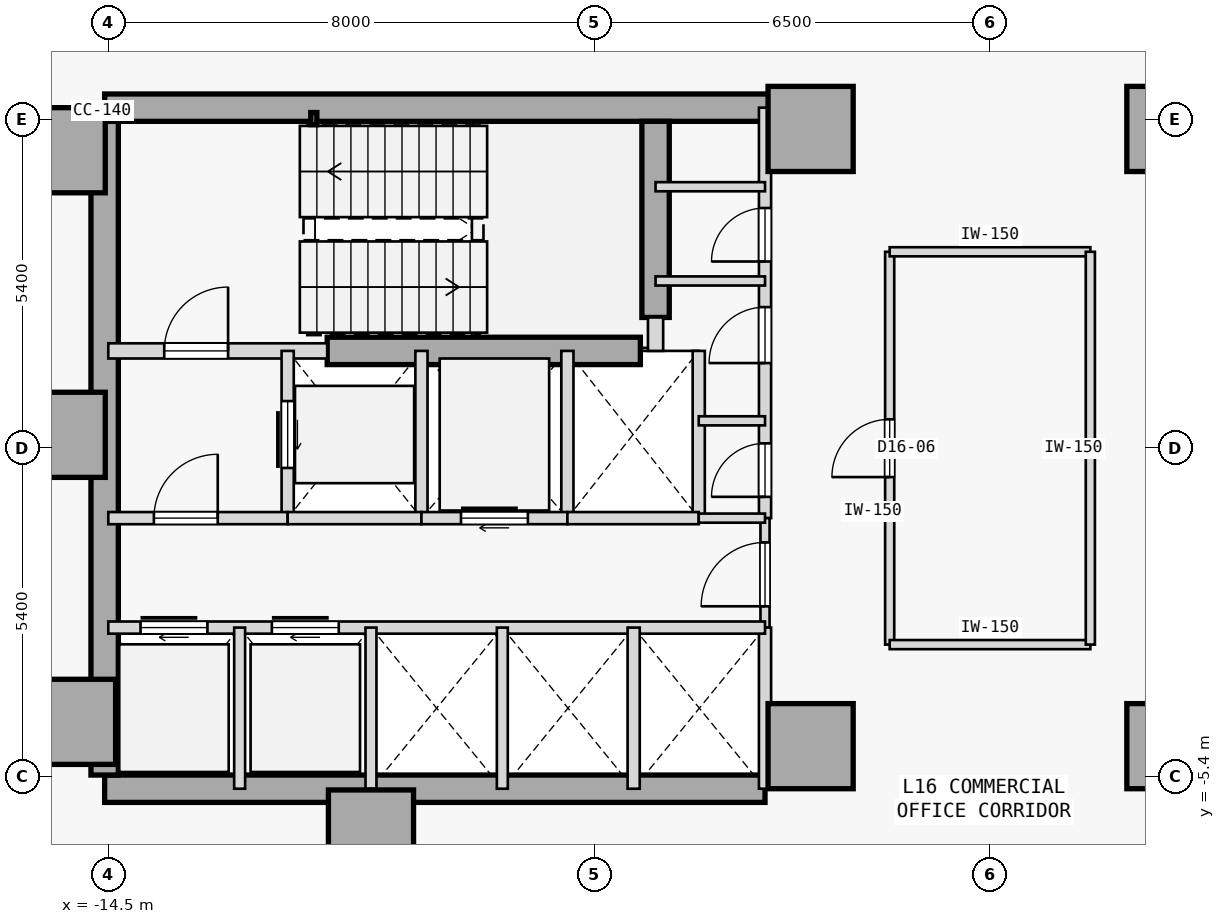
"""IFC4 building model, lengths in metres.
Left out: names, types, materials, properties, quantities, classifications, styles, units other than length and angle.
Written with IfcOpenShell. Run it as: python <this file> out.ifc"""

import sys

from ifc_helpers import new_model, si_unit, direction, frame, frame_2d, origin, origin_2d, place, context, subcontext, project, spatial, rectangle, hollow_rectangle, extrude, element, fill, save


model = new_model("IFC4")
c1 = context("Model", 3, precision=1e-05, world=origin(), true_north=direction((0.0, 1.0)))
c2 = subcontext(c1, "Body", "Model", "MODEL_VIEW")
j1 = project(units=[si_unit("LENGTHUNIT", "METRE"), si_unit("PLANEANGLEUNIT", "RADIAN")], contexts=[c1])
p1 = place(None, origin())
s1 = spatial("IfcSite", under=j1, at=p1, CompositionType="ELEMENT")
p2 = place(p1, origin())
s2 = spatial("IfcBuilding", under=s1, at=p2, CompositionType="ELEMENT")
p3 = place(p2, frame((0.0, 0.0, 67.4)))
s3 = spatial("IfcBuildingStorey", under=s2, at=p3, CompositionType="ELEMENT", Elevation=67.4)
for number, where, z_axis, x_axis in (
    (1, (-15.25, 4.9, 0.0), (0.0, 0.0, 1.0), (1.0, 0.0, 0.0)),
    (2, (-15.25, 0.22, 0.0), (0.0, 0.0, 1.0), (1.0, 0.0, 0.0)),
    (3, (-15.08, -4.5, 0.0), (0.0, 0.0, 1.0), (1.0, 0.0, 0.0)),
    (4, (-10.18, -6.32, 0.0), (0.0, 0.0, 1.0), (1.0, 0.0, 0.0)),
    (5, (-2.95, -4.9, 0.0), (0.0, 0.0, 1.0), (1.0, 0.0, 0.0)),
    (6, (-2.95, 5.25, 0.0), (0.0, 0.0, 1.0), (1.0, 0.0, 0.0)),
    (7, (2.95, -4.9, 0.0), (0.0, 0.0, 1.0), (1.0, 0.0, 0.0)),
    (8, (2.95, 5.25, 0.0), (0.0, 0.0, 1.0), (1.0, 0.0, 0.0)),
):
    element("IfcColumn", number, at=place(p3, frame(where, z_axis=z_axis, x_axis=x_axis)), inside=s3, PredefinedType="COLUMN", context=c2, shape_type="SweptSolid", body=[
        extrude(rectangle(XDim=1.4, YDim=1.4, at=origin_2d()), origin(), (0.0, 0.0, 1.0), 3.8),
    ])
p4 = place(p3, frame((-14.56, 5.6, 0.0), z_axis=(0.0, 0.0, 1.0), x_axis=(1.0, 0.0, 0.0)))
e9 = element("IfcWall", 9, at=p4, inside=s3, PredefinedType="SHEAR", context=c2, shape_type="SweptSolid", body=[
    extrude(rectangle(XDim=11.41, YDim=0.45, at=frame_2d((5.705, 0.0))), origin(), (0.0, 0.0, 1.0), 3.575),
])
p5 = place(p3, frame((-14.56, -5.6, 0.0), z_axis=(0.0, 0.0, 1.0), x_axis=(1.0, 0.0, 0.0)))
e10 = element("IfcWall", 10, at=p5, inside=s3, PredefinedType="SHEAR", context=c2, shape_type="SweptSolid", body=[
    extrude(rectangle(XDim=10.86, YDim=0.45, at=frame_2d((5.43, 0.0))), origin(), (0.0, 0.0, 1.0), 3.575),
])
p6 = place(p3, frame((-14.56, -5.375, 0.0), z_axis=(0.0, 0.0, 1.0), x_axis=(0.0, 1.0, 0.0)))
e11 = element("IfcWall", 11, at=p6, inside=s3, PredefinedType="SHEAR", context=c2, shape_type="SweptSolid", body=[
    extrude(rectangle(XDim=10.75, YDim=0.45, at=frame_2d((5.375, 0.0))), origin(), (0.0, 0.0, 1.0), 3.575),
])
p7 = place(p3, frame((-5.5, 2.15, 0.0), z_axis=(0.0, 0.0, 1.0), x_axis=(0.0, 1.0, 0.0)))
e12 = element("IfcWall", 12, at=p7, inside=s3, PredefinedType="SHEAR", context=c2, shape_type="SweptSolid", body=[
    extrude(rectangle(XDim=3.225, YDim=0.45, at=frame_2d((1.613, 0.0))), origin(), (0.0, 0.0, 1.0), 3.575),
])
p8 = place(p3, frame((-10.9, 1.6, 0.0), z_axis=(0.0, 0.0, 1.0), x_axis=(1.0, 0.0, 0.0)))
e13 = element("IfcWall", 13, at=p8, inside=s3, PredefinedType="SHEAR", context=c2, shape_type="SweptSolid", body=[
    extrude(rectangle(XDim=5.15, YDim=0.45, at=frame_2d((2.575, 0.0))), origin(), (0.0, 0.0, 1.0), 3.575),
])
p9 = place(p3, frame((-11.12, 5.42, 0.0), z_axis=(0.0, 0.0, 1.0), x_axis=(1.0, 0.0, 0.0)))
e14 = element("IfcColumn", 14, at=p9, inside=s3, PredefinedType="COLUMN", context=c2, shape_type="SweptSolid", body=[
    extrude(hollow_rectangle(XDim=0.1, YDim=0.2, WallThickness=0.008, at=origin_2d()), origin(), (0.0, 0.0, 1.0), 3.8),
])
p10 = place(p3, frame((-14.5, 1.6, 0.0), z_axis=(0.0, 0.0, 1.0), x_axis=(1.0, 0.0, 0.0)))
e15 = element("IfcWall", 15, at=p10, inside=s3, PredefinedType="STANDARD", context=c2, shape_type="SweptSolid", body=[
    extrude(rectangle(XDim=3.6, YDim=0.25, at=frame_2d((1.8, 0.0))), origin(), (0.0, 0.0, 1.0), 3.575),
])
p11 = place(p10, frame((0.92, 0.0, 0.0)))
e16 = element("IfcOpeningElement", 16, at=p11, cuts=e15, PredefinedType="OPENING", context=c2, shape_type="SweptSolid", body=[
    extrude(rectangle(XDim=1.05, YDim=2.15, at=frame_2d((0.525, 1.075))), frame((0.0, 0.135, 0.0), z_axis=(0.0, -1.0, 0.0), x_axis=(1.0, 0.0, 0.0)), (0.0, 0.0, 1.0), 0.27),
])
p12 = place(p3, frame((-5.5, 1.6, 0.0), z_axis=(0.0, 0.0, 1.0), x_axis=(0.0, 1.0, 0.0)))
e17 = element("IfcWall", 17, at=p12, inside=s3, PredefinedType="STANDARD", context=c2, shape_type="SweptSolid", body=[
    extrude(rectangle(XDim=0.55, YDim=0.25, at=frame_2d((0.275, 0.0))), origin(), (0.0, 0.0, 1.0), 3.575),
])
p13 = place(p3, frame((-3.7, -1.15, 0.0), z_axis=(0.0, 0.0, 1.0), x_axis=(0.0, 1.0, 0.0)))
e18 = element("IfcWall", 18, at=p13, inside=s3, PredefinedType="STANDARD", context=c2, shape_type="SweptSolid", body=[
    extrude(rectangle(XDim=6.75, YDim=0.2, at=frame_2d((3.375, 0.0))), origin(), (0.0, 0.0, 1.0), 3.575),
])
p14 = place(p13, frame((0.35, 0.0, 0.0)))
e19 = element("IfcOpeningElement", 19, at=p14, cuts=e18, PredefinedType="OPENING", context=c2, shape_type="SweptSolid", body=[
    extrude(rectangle(XDim=0.88, YDim=2.15, at=frame_2d((0.44, 1.075))), frame((0.0, 0.11, 0.0), z_axis=(0.0, -1.0, 0.0), x_axis=(1.0, 0.0, 0.0)), (0.0, 0.0, 1.0), 0.22),
])
p15 = place(p13, frame((2.55, 0.0, 0.0)))
e20 = element("IfcOpeningElement", 20, at=p15, cuts=e18, PredefinedType="OPENING", context=c2, shape_type="SweptSolid", body=[
    extrude(rectangle(XDim=0.92, YDim=2.15, at=frame_2d((0.46, 1.075))), frame((0.0, 0.11, 0.0), z_axis=(0.0, -1.0, 0.0), x_axis=(1.0, 0.0, 0.0)), (0.0, 0.0, 1.0), 0.22),
])
p16 = place(p13, frame((4.22, 0.0, 0.0)))
e21 = element("IfcOpeningElement", 21, at=p16, cuts=e18, PredefinedType="OPENING", context=c2, shape_type="SweptSolid", body=[
    extrude(rectangle(XDim=0.88, YDim=2.15, at=frame_2d((0.44, 1.075))), frame((0.0, 0.11, 0.0), z_axis=(0.0, -1.0, 0.0), x_axis=(1.0, 0.0, 0.0)), (0.0, 0.0, 1.0), 0.22),
])
p17 = place(p3, frame((-3.7, -2.95, 0.0), z_axis=(0.0, 0.0, 1.0), x_axis=(0.0, 1.0, 0.0)))
e22 = element("IfcWall", 22, at=p17, inside=s3, PredefinedType="PARTITIONING", context=c2, shape_type="SweptSolid", body=[
    extrude(rectangle(XDim=1.8, YDim=0.15, at=frame_2d((0.9, 0.0))), origin(), (0.0, 0.0, 1.0), 3.575),
])
p18 = place(p17, frame((0.35, 0.0, 0.0)))
e23 = element("IfcOpeningElement", 23, at=p18, cuts=e22, PredefinedType="OPENING", context=c2, shape_type="SweptSolid", body=[
    extrude(rectangle(XDim=1.05, YDim=2.18, at=frame_2d((0.525, 1.09))), frame((0.0, 0.085, 0.0), z_axis=(0.0, -1.0, 0.0), x_axis=(1.0, 0.0, 0.0)), (0.0, 0.0, 1.0), 0.17),
])
p19 = place(p3, frame((-3.7, -5.6, 0.0), z_axis=(0.0, 0.0, 1.0), x_axis=(0.0, 1.0, 0.0)))
e24 = element("IfcWall", 24, at=p19, inside=s3, PredefinedType="STANDARD", context=c2, shape_type="SweptSolid", body=[
    extrude(rectangle(XDim=2.65, YDim=0.2, at=frame_2d((1.325, 0.0))), origin(), (0.0, 0.0, 1.0), 3.575),
])
p20 = place(p3, frame((-11.55, -1.15, 0.0), z_axis=(0.0, 0.0, 1.0), x_axis=(0.0, 1.0, 0.0)))
e25 = element("IfcWall", 25, at=p20, inside=s3, PredefinedType="STANDARD", context=c2, shape_type="SweptSolid", body=[
    extrude(rectangle(XDim=2.75, YDim=0.2, at=frame_2d((1.375, 0.0))), origin(), (0.0, 0.0, 1.0), 3.575),
])
p21 = place(p20, frame((0.825, 0.0, 0.0)))
e26 = element("IfcOpeningElement", 26, at=p21, cuts=e25, PredefinedType="OPENING", context=c2, shape_type="SweptSolid", body=[
    extrude(rectangle(XDim=1.1, YDim=2.15, at=frame_2d((0.55, 1.075))), frame((0.0, 0.11, 0.0), z_axis=(0.0, -1.0, 0.0), x_axis=(1.0, 0.0, 0.0)), (0.0, 0.0, 1.0), 0.22),
])
p22 = place(p3, frame((-9.35, -1.15, 0.0), z_axis=(0.0, 0.0, 1.0), x_axis=(0.0, 1.0, 0.0)))
e27 = element("IfcWall", 27, at=p22, inside=s3, PredefinedType="STANDARD", context=c2, shape_type="SweptSolid", body=[
    extrude(rectangle(XDim=2.75, YDim=0.2, at=frame_2d((1.375, 0.0))), origin(), (0.0, 0.0, 1.0), 3.575),
])
p23 = place(p3, frame((-14.5, -1.15, 0.0), z_axis=(0.0, 0.0, 1.0), x_axis=(1.0, 0.0, 0.0)))
e28 = element("IfcWall", 28, at=p23, inside=s3, PredefinedType="STANDARD", context=c2, shape_type="SweptSolid", body=[
    extrude(rectangle(XDim=2.95, YDim=0.2, at=frame_2d((1.475, 0.0))), origin(), (0.0, 0.0, 1.0), 3.575),
])
p24 = place(p23, frame((0.75, 0.0, 0.0)))
e29 = element("IfcOpeningElement", 29, at=p24, cuts=e28, PredefinedType="OPENING", context=c2, shape_type="SweptSolid", body=[
    extrude(rectangle(XDim=1.05, YDim=2.18, at=frame_2d((0.525, 1.09))), frame((0.0, 0.11, 0.0), z_axis=(0.0, -1.0, 0.0), x_axis=(1.0, 0.0, 0.0)), (0.0, 0.0, 1.0), 0.22),
])
p25 = place(p3, frame((-11.55, -1.15, 0.0), z_axis=(0.0, 0.0, 1.0), x_axis=(1.0, 0.0, 0.0)))
e30 = element("IfcWall", 30, at=p25, inside=s3, PredefinedType="STANDARD", context=c2, shape_type="SweptSolid", body=[
    extrude(rectangle(XDim=2.2, YDim=0.2, at=frame_2d((1.1, 0.0))), origin(), (0.0, 0.0, 1.0), 3.575),
])
p26 = place(p3, frame((-6.95, -1.15, 0.0), z_axis=(0.0, 0.0, 1.0), x_axis=(0.0, 1.0, 0.0)))
e31 = element("IfcWall", 31, at=p26, inside=s3, PredefinedType="STANDARD", context=c2, shape_type="SweptSolid", body=[
    extrude(rectangle(XDim=2.75, YDim=0.2, at=frame_2d((1.375, 0.0))), origin(), (0.0, 0.0, 1.0), 3.575),
])
p27 = place(p3, frame((-9.35, -1.15, 0.0), z_axis=(0.0, 0.0, 1.0), x_axis=(1.0, 0.0, 0.0)))
e32 = element("IfcWall", 32, at=p27, inside=s3, PredefinedType="STANDARD", context=c2, shape_type="SweptSolid", body=[
    extrude(rectangle(XDim=2.4, YDim=0.2, at=frame_2d((1.2, 0.0))), origin(), (0.0, 0.0, 1.0), 3.575),
])
p28 = place(p27, frame((0.65, 0.0, 0.0)))
e33 = element("IfcOpeningElement", 33, at=p28, cuts=e32, PredefinedType="OPENING", context=c2, shape_type="SweptSolid", body=[
    extrude(rectangle(XDim=1.1, YDim=2.15, at=frame_2d((0.55, 1.075))), frame((0.0, 0.11, 0.0), z_axis=(0.0, -1.0, 0.0), x_axis=(1.0, 0.0, 0.0)), (0.0, 0.0, 1.0), 0.22),
])
p29 = place(p3, frame((-4.79, -1.15, 0.0), z_axis=(0.0, 0.0, 1.0), x_axis=(0.0, 1.0, 0.0)))
e34 = element("IfcWall", 34, at=p29, inside=s3, PredefinedType="STANDARD", context=c2, shape_type="SweptSolid", body=[
    extrude(rectangle(XDim=2.75, YDim=0.2, at=frame_2d((1.375, 0.0))), origin(), (0.0, 0.0, 1.0), 3.575),
])
p30 = place(p3, frame((-6.95, -1.15, 0.0), z_axis=(0.0, 0.0, 1.0), x_axis=(1.0, 0.0, 0.0)))
e35 = element("IfcWall", 35, at=p30, inside=s3, PredefinedType="STANDARD", context=c2, shape_type="SweptSolid", body=[
    extrude(rectangle(XDim=2.16, YDim=0.2, at=frame_2d((1.08, 0.0))), origin(), (0.0, 0.0, 1.0), 3.575),
])
p31 = place(p3, frame((-4.79, -1.15, 0.0), z_axis=(0.0, 0.0, 1.0), x_axis=(1.0, 0.0, 0.0)))
e36 = element("IfcWall", 36, at=p31, inside=s3, PredefinedType="PARTITIONING", context=c2, shape_type="SweptSolid", body=[
    extrude(rectangle(XDim=1.09, YDim=0.15, at=frame_2d((0.545, 0.0))), origin(), (0.0, 0.0, 1.0), 3.575),
])
p32 = place(p3, frame((-14.5, -2.95, 0.0), z_axis=(0.0, 0.0, 1.0), x_axis=(1.0, 0.0, 0.0)))
e37 = element("IfcWall", 37, at=p32, inside=s3, PredefinedType="STANDARD", context=c2, shape_type="SweptSolid", body=[
    extrude(rectangle(XDim=10.8, YDim=0.2, at=frame_2d((5.4, 0.0))), origin(), (0.0, 0.0, 1.0), 3.575),
])
p33 = place(p32, frame((0.53, 0.0, 0.0)))
e38 = element("IfcOpeningElement", 38, at=p33, cuts=e37, PredefinedType="OPENING", context=c2, shape_type="SweptSolid", body=[
    extrude(rectangle(XDim=1.1, YDim=2.15, at=frame_2d((0.55, 1.075))), frame((0.0, 0.11, 0.0), z_axis=(0.0, -1.0, 0.0), x_axis=(1.0, 0.0, 0.0)), (0.0, 0.0, 1.0), 0.22),
])
p34 = place(p32, frame((2.69, 0.0, 0.0)))
e39 = element("IfcOpeningElement", 39, at=p34, cuts=e37, PredefinedType="OPENING", context=c2, shape_type="SweptSolid", body=[
    extrude(rectangle(XDim=1.1, YDim=2.15, at=frame_2d((0.55, 1.075))), frame((0.0, 0.11, 0.0), z_axis=(0.0, -1.0, 0.0), x_axis=(1.0, 0.0, 0.0)), (0.0, 0.0, 1.0), 0.22),
])
p35 = place(p3, frame((-5.86, -5.6, 0.0), z_axis=(0.0, 0.0, 1.0), x_axis=(0.0, 1.0, 0.0)))
e40 = element("IfcWall", 40, at=p35, inside=s3, PredefinedType="STANDARD", context=c2, shape_type="SweptSolid", body=[
    extrude(rectangle(XDim=2.65, YDim=0.2, at=frame_2d((1.325, 0.0))), origin(), (0.0, 0.0, 1.0), 3.575),
])
for number, where, z_axis, x_axis in (
    (41, (-12.34, -5.6, 0.0), (0.0, 0.0, 1.0), (0.0, 1.0, 0.0)),
    (42, (-10.18, -5.6, 0.0), (0.0, 0.0, 1.0), (0.0, 1.0, 0.0)),
    (43, (-8.02, -5.6, 0.0), (0.0, 0.0, 1.0), (0.0, 1.0, 0.0)),
):
    element("IfcWall", number, at=place(p3, frame(where, z_axis=z_axis, x_axis=x_axis)), inside=s3, PredefinedType="STANDARD", context=c2, shape_type="SweptSolid", body=[
        extrude(rectangle(XDim=2.65, YDim=0.18, at=frame_2d((1.325, 0.0))), origin(), (0.0, 0.0, 1.0), 3.575),
    ])
p36 = place(p3, frame((-5.5, 4.3, 0.0), z_axis=(0.0, 0.0, 1.0), x_axis=(1.0, 0.0, 0.0)))
e44 = element("IfcWall", 44, at=p36, inside=s3, PredefinedType="PARTITIONING", context=c2, shape_type="SweptSolid", body=[
    extrude(rectangle(XDim=1.8, YDim=0.15, at=frame_2d((0.9, 0.0))), origin(), (0.0, 0.0, 1.0), 3.575),
])
p37 = place(p3, frame((-4.79, 0.45, 0.0), z_axis=(0.0, 0.0, 1.0), x_axis=(1.0, 0.0, 0.0)))
e45 = element("IfcWall", 45, at=p37, inside=s3, PredefinedType="PARTITIONING", context=c2, shape_type="SweptSolid", body=[
    extrude(rectangle(XDim=1.09, YDim=0.15, at=frame_2d((0.545, 0.0))), origin(), (0.0, 0.0, 1.0), 3.575),
])
p38 = place(p3, frame((-5.5, 2.75, 0.0), z_axis=(0.0, 0.0, 1.0), x_axis=(1.0, 0.0, 0.0)))
e46 = element("IfcWall", 46, at=p38, inside=s3, PredefinedType="PARTITIONING", context=c2, shape_type="SweptSolid", body=[
    extrude(rectangle(XDim=1.8, YDim=0.15, at=frame_2d((0.9, 0.0))), origin(), (0.0, 0.0, 1.0), 3.575),
])
p39 = place(p3, frame((-1.65, -3.23, 0.0), z_axis=(0.0, 0.0, 1.0), x_axis=(0.0, 1.0, 0.0)))
e47 = element("IfcWall", 47, at=p39, inside=s3, PredefinedType="PARTITIONING", context=c2, shape_type="SweptSolid", body=[
    extrude(rectangle(XDim=6.46, YDim=0.15, at=frame_2d((3.23, 0.0))), origin(), (0.0, 0.0, 1.0), 3.575),
])
p40 = place(p39, frame((2.755, 0.0, 0.0)))
e48 = element("IfcOpeningElement", 48, at=p40, cuts=e47, PredefinedType="OPENING", context=c2, shape_type="SweptSolid", body=[
    extrude(rectangle(XDim=0.95, YDim=2.15, at=frame_2d((0.475, 1.075))), frame((0.0, 0.085, 0.0), z_axis=(0.0, -1.0, 0.0), x_axis=(1.0, 0.0, 0.0)), (0.0, 0.0, 1.0), 0.17),
])
for number, where, z_axis, x_axis in (
    (49, (-1.65, -3.23, 0.0), (0.0, 0.0, 1.0), (1.0, 0.0, 0.0)),
    (50, (-1.65, 3.23, 0.0), (0.0, 0.0, 1.0), (1.0, 0.0, 0.0)),
):
    element("IfcWall", number, at=place(p3, frame(where, z_axis=z_axis, x_axis=x_axis)), inside=s3, PredefinedType="PARTITIONING", context=c2, shape_type="SweptSolid", body=[
        extrude(rectangle(XDim=3.3, YDim=0.15, at=frame_2d((1.65, 0.0))), origin(), (0.0, 0.0, 1.0), 3.575),
    ])
p41 = place(p3, frame((1.65, -3.23, 0.0), z_axis=(0.0, 0.0, 1.0), x_axis=(0.0, 1.0, 0.0)))
e51 = element("IfcWall", 51, at=p41, inside=s3, PredefinedType="PARTITIONING", context=c2, shape_type="SweptSolid", body=[
    extrude(rectangle(XDim=6.46, YDim=0.15, at=frame_2d((3.23, 0.0))), origin(), (0.0, 0.0, 1.0), 3.575),
])
p42 = place(p11, origin())
e52 = element("IfcDoor", 52, at=p42, inside=s3, OperationType="SINGLE_SWING_RIGHT", PredefinedType="DOOR", context=c2, shape_type="SweptSolid", body=[
    extrude(rectangle(XDim=1.05, YDim=2.15, at=frame_2d((0.525, 1.075))), frame((0.0, 0.025, 0.0), z_axis=(0.0, -1.0, 0.0), x_axis=(1.0, 0.0, 0.0)), (0.0, 0.0, 1.0), 0.05),
])
fill(e16, e52)
p43 = place(p24, origin())
e53 = element("IfcDoor", 53, at=p43, inside=s3, OperationType="SINGLE_SWING_RIGHT", PredefinedType="DOOR", context=c2, shape_type="SweptSolid", body=[
    extrude(rectangle(XDim=1.05, YDim=2.18, at=frame_2d((0.525, 1.09))), frame((0.0, 0.025, 0.0), z_axis=(0.0, -1.0, 0.0), x_axis=(1.0, 0.0, 0.0)), (0.0, 0.0, 1.0), 0.05),
])
fill(e29, e53)
p44 = place(p18, origin())
e54 = element("IfcDoor", 54, at=p44, inside=s3, OperationType="SINGLE_SWING_LEFT", PredefinedType="DOOR", context=c2, shape_type="SweptSolid", body=[
    extrude(rectangle(XDim=1.05, YDim=2.18, at=frame_2d((0.525, 1.09))), frame((0.0, 0.025, 0.0), z_axis=(0.0, -1.0, 0.0), x_axis=(1.0, 0.0, 0.0)), (0.0, 0.0, 1.0), 0.05),
])
fill(e23, e54)
p45 = place(p21, origin())
e55 = element("IfcDoor", 55, at=p45, inside=s3, OperationType="SLIDING_TO_RIGHT", PredefinedType="DOOR", context=c2, shape_type="SweptSolid", body=[
    extrude(rectangle(XDim=1.1, YDim=2.15, at=frame_2d((0.55, 1.075))), frame((0.0, 0.025, 0.0), z_axis=(0.0, -1.0, 0.0), x_axis=(1.0, 0.0, 0.0)), (0.0, 0.0, 1.0), 0.05),
])
fill(e26, e55)
p46 = place(p28, origin())
e56 = element("IfcDoor", 56, at=p46, inside=s3, OperationType="SLIDING_TO_RIGHT", PredefinedType="DOOR", context=c2, shape_type="SweptSolid", body=[
    extrude(rectangle(XDim=1.1, YDim=2.15, at=frame_2d((0.55, 1.075))), frame((0.0, 0.025, 0.0), z_axis=(0.0, -1.0, 0.0), x_axis=(1.0, 0.0, 0.0)), (0.0, 0.0, 1.0), 0.05),
])
fill(e33, e56)
p47 = place(p33, origin())
e57 = element("IfcDoor", 57, at=p47, inside=s3, OperationType="SLIDING_TO_RIGHT", PredefinedType="DOOR", context=c2, shape_type="SweptSolid", body=[
    extrude(rectangle(XDim=1.1, YDim=2.15, at=frame_2d((0.55, 1.075))), frame((0.0, 0.025, 0.0), z_axis=(0.0, -1.0, 0.0), x_axis=(1.0, 0.0, 0.0)), (0.0, 0.0, 1.0), 0.05),
])
fill(e38, e57)
p48 = place(p34, origin())
e58 = element("IfcDoor", 58, at=p48, inside=s3, OperationType="SLIDING_TO_RIGHT", PredefinedType="DOOR", context=c2, shape_type="SweptSolid", body=[
    extrude(rectangle(XDim=1.1, YDim=2.15, at=frame_2d((0.55, 1.075))), frame((0.0, 0.025, 0.0), z_axis=(0.0, -1.0, 0.0), x_axis=(1.0, 0.0, 0.0)), (0.0, 0.0, 1.0), 0.05),
])
fill(e39, e58)
p49 = place(p14, origin())
e59 = element("IfcDoor", 59, at=p49, inside=s3, OperationType="SINGLE_SWING_LEFT", PredefinedType="DOOR", context=c2, shape_type="SweptSolid", body=[
    extrude(rectangle(XDim=0.88, YDim=2.15, at=frame_2d((0.44, 1.075))), frame((0.0, 0.025, 0.0), z_axis=(0.0, -1.0, 0.0), x_axis=(1.0, 0.0, 0.0)), (0.0, 0.0, 1.0), 0.05),
])
fill(e19, e59)
p50 = place(p15, origin())
e60 = element("IfcDoor", 60, at=p50, inside=s3, OperationType="SINGLE_SWING_LEFT", PredefinedType="DOOR", context=c2, shape_type="SweptSolid", body=[
    extrude(rectangle(XDim=0.92, YDim=2.15, at=frame_2d((0.46, 1.075))), frame((0.0, 0.025, 0.0), z_axis=(0.0, -1.0, 0.0), x_axis=(1.0, 0.0, 0.0)), (0.0, 0.0, 1.0), 0.05),
])
fill(e20, e60)
p51 = place(p16, origin())
e61 = element("IfcDoor", 61, at=p51, inside=s3, OperationType="SINGLE_SWING_LEFT", PredefinedType="DOOR", context=c2, shape_type="SweptSolid", body=[
    extrude(rectangle(XDim=0.88, YDim=2.15, at=frame_2d((0.44, 1.075))), frame((0.0, 0.025, 0.0), z_axis=(0.0, -1.0, 0.0), x_axis=(1.0, 0.0, 0.0)), (0.0, 0.0, 1.0), 0.05),
])
fill(e21, e61)
p52 = place(p40, origin())
e62 = element("IfcDoor", 62, at=p52, inside=s3, OperationType="SINGLE_SWING_LEFT", PredefinedType="DOOR", context=c2, shape_type="SweptSolid", body=[
    extrude(rectangle(XDim=0.95, YDim=2.15, at=frame_2d((0.475, 1.075))), frame((0.0, 0.025, 0.0), z_axis=(0.0, -1.0, 0.0), x_axis=(1.0, 0.0, 0.0)), (0.0, 0.0, 1.0), 0.05),
])
fill(e48, e62)
save(model, sys.argv[1])
